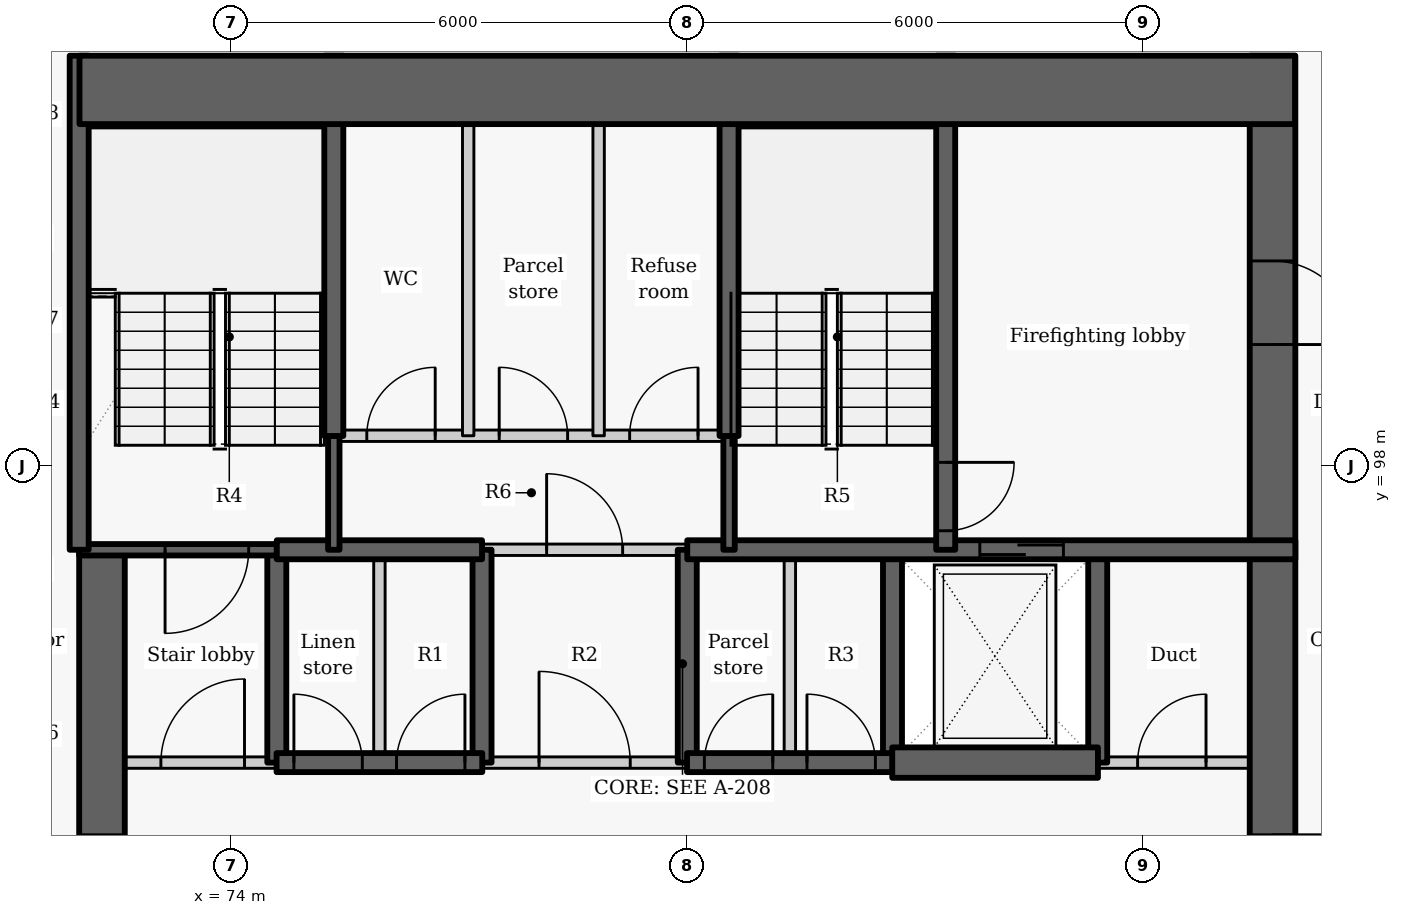
"""IFC4 building model, lengths in metres.
Left out: names, types, materials, properties, quantities, classifications, styles, units other than length and angle.
Written with IfcOpenShell. Run it as: python <this file> out.ifc"""

import sys

from ifc_helpers import new_model, si_unit, direction, frame, frame_2d, origin, place, context, subcontext, project, spatial, rectangle, extrude, element, fill, save


model = new_model("IFC4")
c1 = context("Model", 3, precision=1e-05, world=origin(), true_north=direction((0.0, 1.0)))
c2 = subcontext(c1, "Body", "Model", "MODEL_VIEW")
j1 = project(units=[si_unit("LENGTHUNIT", "METRE"), si_unit("PLANEANGLEUNIT", "RADIAN")], contexts=[c1])
p1 = place(None, origin())
s1 = spatial("IfcSite", under=j1, at=p1, CompositionType="ELEMENT")
p2 = place(p1, origin())
s2 = spatial("IfcBuilding", under=s1, at=p2, CompositionType="ELEMENT")
p3 = place(p2, frame((0.0, 0.0, 31.5)))
s3 = spatial("IfcBuildingStorey", under=s2, at=p3, CompositionType="ELEMENT", Elevation=31.5)
p4 = place(p3, frame((74.6, 94.1, -0.275), z_axis=(0.0, 0.0, 1.0), x_axis=(0.0, 1.0, 0.0)))
e1 = element("IfcWall", 1, at=p4, inside=s3, PredefinedType="SHEAR", context=c2, shape_type="SweptSolid", body=[
    extrude(rectangle(XDim=2.8, YDim=0.25, at=frame_2d((1.4, 0.0))), origin(), (0.0, 0.0, 1.0), 3.3),
])
p5 = place(p3, frame((72.3, 87.8, -0.275), z_axis=(0.0, 0.0, 1.0), x_axis=(0.0, 1.0, 0.0)))
e2 = element("IfcWall", 2, at=p5, inside=s3, PredefinedType="SHEAR", context=c2, shape_type="SweptSolid", body=[
    extrude(rectangle(XDim=9.1, YDim=0.6, at=frame_2d((4.55, 0.0))), origin(), (0.0, 0.0, 1.0), 3.3),
])
p6 = place(p5, frame((3.85, 0.0, 0.275)))
e3 = element("IfcOpeningElement", 3, at=p6, cuts=e2, PredefinedType="OPENING", context=c2, shape_type="SweptSolid", body=[
    extrude(rectangle(XDim=1.5, YDim=2.1, at=frame_2d((0.75, 1.05))), frame((0.0, 0.31, 0.0), z_axis=(0.0, -1.0, 0.0), x_axis=(1.0, 0.0, 0.0)), (0.0, 0.0, 1.0), 0.62),
])
for number, where, z_axis, x_axis in (
    (4, (77.3, 94.1, -0.275), (0.0, 0.0, 1.0), (0.0, 1.0, 0.0)),
    (5, (80.0, 94.1, -0.275), (0.0, 0.0, 1.0), (0.0, 1.0, 0.0)),
    (6, (82.7, 94.1, -0.275), (0.0, 0.0, 1.0), (0.0, 1.0, 0.0)),
    (7, (85.4, 94.1, -0.275), (0.0, 0.0, 1.0), (0.0, 1.0, 0.0)),
):
    element("IfcWall", number, at=place(p3, frame(where, z_axis=z_axis, x_axis=x_axis)), inside=s3, PredefinedType="SHEAR", context=c2, shape_type="SweptSolid", body=[
        extrude(rectangle(XDim=2.8, YDim=0.25, at=frame_2d((1.4, 0.0))), origin(), (0.0, 0.0, 1.0), 3.3),
    ])
p7 = place(p3, frame((87.7, 103.4, -0.275), z_axis=(0.0, 0.0, 1.0), x_axis=(0.0, -1.0, 0.0)))
e8 = element("IfcWall", 8, at=p7, inside=s3, PredefinedType="SHEAR", context=c2, shape_type="SweptSolid", body=[
    extrude(rectangle(XDim=15.6, YDim=0.6, at=frame_2d((7.8, 0.0))), origin(), (0.0, 0.0, 1.0), 3.3),
])
p8 = place(p7, frame((10.25, 0.0, 0.275)))
e9 = element("IfcOpeningElement", 9, at=p8, cuts=e8, PredefinedType="OPENING", context=c2, shape_type="SweptSolid", body=[
    extrude(rectangle(XDim=1.5, YDim=2.1, at=frame_2d((0.75, 1.05))), frame((0.0, 0.31, 0.0), z_axis=(0.0, -1.0, 0.0), x_axis=(1.0, 0.0, 0.0)), (0.0, 0.0, 1.0), 0.62),
])
p9 = place(p7, frame((2.7, 0.0, 0.275)))
e10 = element("IfcOpeningElement", 10, at=p9, cuts=e8, PredefinedType="OPENING", context=c2, shape_type="SweptSolid", body=[
    extrude(rectangle(XDim=1.1, YDim=2.1, at=frame_2d((0.55, 1.05))), frame((0.0, 0.31, 0.0), z_axis=(0.0, -1.0, 0.0), x_axis=(1.0, 0.0, 0.0)), (0.0, 0.0, 1.0), 0.62),
])
p10 = place(p3, frame((72.0, 94.1, 0.0), z_axis=(0.0, 0.0, 1.0), x_axis=(1.0, 0.0, 0.0)))
e11 = element("IfcWall", 11, at=p10, inside=s3, PredefinedType="PARTITIONING", context=c2, shape_type="SweptSolid", body=[
    extrude(rectangle(XDim=2.603, YDim=0.15, at=frame_2d((1.302, 0.0))), origin(), (0.0, 0.0, 1.0), 3.025),
])
p11 = place(p10, frame((1.075, 0.0, 0.0)))
e12 = element("IfcOpeningElement", 12, at=p11, cuts=e11, PredefinedType="OPENING", context=c2, shape_type="SweptSolid", body=[
    extrude(rectangle(XDim=1.1, YDim=2.1, at=frame_2d((0.55, 1.05))), frame((0.0, 0.085, 0.0), z_axis=(0.0, -1.0, 0.0), x_axis=(1.0, 0.0, 0.0)), (0.0, 0.0, 1.0), 0.17),
])
p12 = place(p3, frame((77.297, 94.1, 0.0), z_axis=(0.0, 0.0, 1.0), x_axis=(1.0, 0.0, 0.0)))
e13 = element("IfcWall", 13, at=p12, inside=s3, PredefinedType="PARTITIONING", context=c2, shape_type="SweptSolid", body=[
    extrude(rectangle(XDim=2.706, YDim=0.15, at=frame_2d((1.353, 0.0))), origin(), (0.0, 0.0, 1.0), 3.025),
])
p13 = place(p12, frame((0.753, 0.0, 0.0)))
e14 = element("IfcOpeningElement", 14, at=p13, cuts=e13, PredefinedType="OPENING", context=c2, shape_type="SweptSolid", body=[
    extrude(rectangle(XDim=1.2, YDim=2.1, at=frame_2d((0.6, 1.05))), frame((0.0, 0.085, 0.0), z_axis=(0.0, -1.0, 0.0), x_axis=(1.0, 0.0, 0.0)), (0.0, 0.0, 1.0), 0.17),
])
p14 = place(p3, frame((85.397, 94.1, 0.0), z_axis=(0.0, 0.0, 1.0), x_axis=(1.0, 0.0, 0.0)))
e15 = element("IfcWall", 15, at=p14, inside=s3, PredefinedType="PARTITIONING", context=c2, shape_type="SweptSolid", body=[
    extrude(rectangle(XDim=2.603, YDim=0.15, at=frame_2d((1.302, 0.0))), origin(), (0.0, 0.0, 1.0), 3.025),
])
p15 = place(p14, frame((0.528, 0.0, 0.0)))
e16 = element("IfcOpeningElement", 16, at=p15, cuts=e15, PredefinedType="OPENING", context=c2, shape_type="SweptSolid", body=[
    extrude(rectangle(XDim=0.9, YDim=2.1, at=frame_2d((0.45, 1.05))), frame((0.0, 0.085, 0.0), z_axis=(0.0, -1.0, 0.0), x_axis=(1.0, 0.0, 0.0)), (0.0, 0.0, 1.0), 0.17),
])
p16 = place(p3, frame((74.597, 94.1, -0.275), z_axis=(0.0, 0.0, 1.0), x_axis=(1.0, 0.0, 0.0)))
e17 = element("IfcWall", 17, at=p16, inside=s3, PredefinedType="SHEAR", context=c2, shape_type="SweptSolid", body=[
    extrude(rectangle(XDim=2.706, YDim=0.25, at=frame_2d((1.353, 0.0))), origin(), (0.0, 0.0, 1.0), 3.3),
])
p17 = place(p16, frame((0.228, 0.0, 0.275)))
e18 = element("IfcOpeningElement", 18, at=p17, cuts=e17, PredefinedType="OPENING", context=c2, shape_type="SweptSolid", body=[
    extrude(rectangle(XDim=0.9, YDim=2.1, at=frame_2d((0.45, 1.05))), frame((0.0, 0.135, 0.0), z_axis=(0.0, -1.0, 0.0), x_axis=(1.0, 0.0, 0.0)), (0.0, 0.0, 1.0), 0.27),
])
p18 = place(p16, frame((1.578, 0.0, 0.275)))
e19 = element("IfcOpeningElement", 19, at=p18, cuts=e17, PredefinedType="OPENING", context=c2, shape_type="SweptSolid", body=[
    extrude(rectangle(XDim=0.9, YDim=2.1, at=frame_2d((0.45, 1.05))), frame((0.0, 0.135, 0.0), z_axis=(0.0, -1.0, 0.0), x_axis=(1.0, 0.0, 0.0)), (0.0, 0.0, 1.0), 0.27),
])
p19 = place(p3, frame((79.997, 94.1, -0.275), z_axis=(0.0, 0.0, 1.0), x_axis=(1.0, 0.0, 0.0)))
e20 = element("IfcWall", 20, at=p19, inside=s3, PredefinedType="SHEAR", context=c2, shape_type="SweptSolid", body=[
    extrude(rectangle(XDim=2.706, YDim=0.25, at=frame_2d((1.353, 0.0))), origin(), (0.0, 0.0, 1.0), 3.3),
])
p20 = place(p19, frame((0.228, 0.0, 0.275)))
e21 = element("IfcOpeningElement", 21, at=p20, cuts=e20, PredefinedType="OPENING", context=c2, shape_type="SweptSolid", body=[
    extrude(rectangle(XDim=0.9, YDim=2.1, at=frame_2d((0.45, 1.05))), frame((0.0, 0.135, 0.0), z_axis=(0.0, -1.0, 0.0), x_axis=(1.0, 0.0, 0.0)), (0.0, 0.0, 1.0), 0.27),
])
p21 = place(p19, frame((1.578, 0.0, 0.275)))
e22 = element("IfcOpeningElement", 22, at=p21, cuts=e20, PredefinedType="OPENING", context=c2, shape_type="SweptSolid", body=[
    extrude(rectangle(XDim=0.9, YDim=2.1, at=frame_2d((0.45, 1.05))), frame((0.0, 0.135, 0.0), z_axis=(0.0, -1.0, 0.0), x_axis=(1.0, 0.0, 0.0)), (0.0, 0.0, 1.0), 0.27),
])
p22 = place(p3, frame((82.697, 94.1, -0.275), z_axis=(0.0, 0.0, 1.0), x_axis=(1.0, 0.0, 0.0)))
e23 = element("IfcWall", 23, at=p22, inside=s3, PredefinedType="SHEAR", context=c2, shape_type="SweptSolid", body=[
    extrude(rectangle(XDim=2.706, YDim=0.4, at=frame_2d((1.353, 0.0))), origin(), (0.0, 0.0, 1.0), 3.3),
])
p23 = place(p3, frame((74.6, 96.9, -0.275), z_axis=(0.0, 0.0, 1.0), x_axis=(-1.0, 0.0, 0.0)))
e24 = element("IfcWall", 24, at=p23, inside=s3, PredefinedType="SHEAR", context=c2, shape_type="SweptSolid", body=[
    extrude(rectangle(XDim=2.6, YDim=0.15, at=frame_2d((1.3, 0.0))), origin(), (0.0, 0.0, 1.0), 3.3),
])
p24 = place(p23, frame((0.37, 0.0, 0.275)))
e25 = element("IfcOpeningElement", 25, at=p24, cuts=e24, PredefinedType="OPENING", context=c2, shape_type="SweptSolid", body=[
    extrude(rectangle(XDim=1.1, YDim=2.1, at=frame_2d((0.55, 1.05))), frame((0.0, 0.085, 0.0), z_axis=(0.0, -1.0, 0.0), x_axis=(1.0, 0.0, 0.0)), (0.0, 0.0, 1.0), 0.17),
])
p25 = place(p3, frame((75.95, 94.1, 0.0), z_axis=(0.0, 0.0, 1.0), x_axis=(0.0, 1.0, 0.0)))
e26 = element("IfcWall", 26, at=p25, inside=s3, PredefinedType="PARTITIONING", context=c2, shape_type="SweptSolid", body=[
    extrude(rectangle(XDim=2.8, YDim=0.15, at=frame_2d((1.4, 0.0))), origin(), (0.0, 0.0, 1.0), 3.025),
])
p26 = place(p3, frame((74.6, 96.9, -0.275), z_axis=(0.0, 0.0, 1.0), x_axis=(1.0, 0.0, 0.0)))
e27 = element("IfcWall", 27, at=p26, inside=s3, PredefinedType="SHEAR", context=c2, shape_type="SweptSolid", body=[
    extrude(rectangle(XDim=2.7, YDim=0.25, at=frame_2d((1.35, 0.0))), origin(), (0.0, 0.0, 1.0), 3.3),
])
p27 = place(p3, frame((80.0, 96.9, -0.275), z_axis=(0.0, 0.0, 1.0), x_axis=(1.0, 0.0, 0.0)))
e28 = element("IfcWall", 28, at=p27, inside=s3, PredefinedType="SHEAR", context=c2, shape_type="SweptSolid", body=[
    extrude(rectangle(XDim=8.0, YDim=0.25, at=frame_2d((4.0, 0.0))), origin(), (0.0, 0.0, 1.0), 3.3),
])
p28 = place(p27, frame((3.849, 0.0, 0.275)))
e29 = element("IfcOpeningElement", 29, at=p28, cuts=e28, PredefinedType="OPENING", context=c2, shape_type="SweptSolid", body=[
    extrude(rectangle(XDim=1.1, YDim=2.1, at=frame_2d((0.55, 1.05))), frame((0.0, 0.135, 0.0), z_axis=(0.0, -1.0, 0.0), x_axis=(1.0, 0.0, 0.0)), (0.0, 0.0, 1.0), 0.27),
])
p29 = place(p3, frame((77.3, 96.9, 0.0), z_axis=(0.0, 0.0, 1.0), x_axis=(1.0, 0.0, 0.0)))
e30 = element("IfcWall", 30, at=p29, inside=s3, PredefinedType="PARTITIONING", context=c2, shape_type="SweptSolid", body=[
    extrude(rectangle(XDim=2.7, YDim=0.15, at=frame_2d((1.35, 0.0))), origin(), (0.0, 0.0, 1.0), 3.025),
])
p30 = place(p29, frame((0.85, 0.0, 0.0)))
e31 = element("IfcOpeningElement", 31, at=p30, cuts=e30, PredefinedType="OPENING", context=c2, shape_type="SweptSolid", body=[
    extrude(rectangle(XDim=1.0, YDim=2.1, at=frame_2d((0.5, 1.05))), frame((0.0, 0.085, 0.0), z_axis=(0.0, -1.0, 0.0), x_axis=(1.0, 0.0, 0.0)), (0.0, 0.0, 1.0), 0.17),
])
p31 = place(p3, frame((81.35, 94.1, 0.0), z_axis=(0.0, 0.0, 1.0), x_axis=(0.0, 1.0, 0.0)))
e32 = element("IfcWall", 32, at=p31, inside=s3, PredefinedType="PARTITIONING", context=c2, shape_type="SweptSolid", body=[
    extrude(rectangle(XDim=2.8, YDim=0.15, at=frame_2d((1.4, 0.0))), origin(), (0.0, 0.0, 1.0), 3.025),
])
p32 = place(p3, frame((75.35, 96.9, -0.275), z_axis=(0.0, 0.0, 1.0), x_axis=(0.0, 1.0, 0.0)))
e33 = element("IfcWall", 33, at=p32, inside=s3, PredefinedType="SHEAR", context=c2, shape_type="SweptSolid", body=[
    extrude(rectangle(XDim=1.503, YDim=0.15, at=frame_2d((0.751, 0.0))), origin(), (0.0, 0.0, 1.0), 3.3),
])
p33 = place(p3, frame((75.35, 98.397, -0.275), z_axis=(0.0, 0.0, 1.0), x_axis=(0.0, 1.0, 0.0)))
e34 = element("IfcWall", 34, at=p33, inside=s3, PredefinedType="SHEAR", context=c2, shape_type="SweptSolid", body=[
    extrude(rectangle(XDim=5.003, YDim=0.25, at=frame_2d((2.501, 0.0))), origin(), (0.0, 0.0, 1.0), 3.3),
])
p34 = place(p3, frame((72.0, 96.9, -0.275), z_axis=(0.0, 0.0, 1.0), x_axis=(0.0, 1.0, 0.0)))
e35 = element("IfcWall", 35, at=p34, inside=s3, PredefinedType="SHEAR", context=c2, shape_type="SweptSolid", body=[
    extrude(rectangle(XDim=6.5, YDim=0.25, at=frame_2d((3.25, 0.0))), origin(), (0.0, 0.0, 1.0), 3.3),
])
p35 = place(p3, frame((83.4, 103.4, -0.275), z_axis=(0.0, 0.0, 1.0), x_axis=(0.0, -1.0, 0.0)))
e36 = element("IfcWall", 36, at=p35, inside=s3, PredefinedType="SHEAR", context=c2, shape_type="SweptSolid", body=[
    extrude(rectangle(XDim=6.5, YDim=0.25, at=frame_2d((3.25, 0.0))), origin(), (0.0, 0.0, 1.0), 3.3),
])
p36 = place(p35, frame((5.35, 0.0, 0.275)))
e37 = element("IfcOpeningElement", 37, at=p36, cuts=e36, PredefinedType="OPENING", context=c2, shape_type="SweptSolid", body=[
    extrude(rectangle(XDim=0.9, YDim=2.1, at=frame_2d((0.45, 1.05))), frame((0.0, 0.135, 0.0), z_axis=(0.0, -1.0, 0.0), x_axis=(1.0, 0.0, 0.0)), (0.0, 0.0, 1.0), 0.27),
])
p37 = place(p3, frame((80.55, 96.9, -0.275), z_axis=(0.0, 0.0, 1.0), x_axis=(0.0, 1.0, 0.0)))
e38 = element("IfcWall", 38, at=p37, inside=s3, PredefinedType="SHEAR", context=c2, shape_type="SweptSolid", body=[
    extrude(rectangle(XDim=1.503, YDim=0.15, at=frame_2d((0.751, 0.0))), origin(), (0.0, 0.0, 1.0), 3.3),
])
p38 = place(p3, frame((80.55, 98.397, -0.275), z_axis=(0.0, 0.0, 1.0), x_axis=(0.0, 1.0, 0.0)))
e39 = element("IfcWall", 39, at=p38, inside=s3, PredefinedType="SHEAR", context=c2, shape_type="SweptSolid", body=[
    extrude(rectangle(XDim=5.003, YDim=0.25, at=frame_2d((2.501, 0.0))), origin(), (0.0, 0.0, 1.0), 3.3),
])
p39 = place(p3, frame((75.35, 98.4, 0.0), z_axis=(0.0, 0.0, 1.0), x_axis=(1.0, 0.0, 0.0)))
e40 = element("IfcWall", 40, at=p39, inside=s3, PredefinedType="PARTITIONING", context=c2, shape_type="SweptSolid", body=[
    extrude(rectangle(XDim=5.2, YDim=0.15, at=frame_2d((2.6, 0.0))), origin(), (0.0, 0.0, 1.0), 3.025),
])
p40 = place(p39, frame((0.434, 0.0, 0.0)))
e41 = element("IfcOpeningElement", 41, at=p40, cuts=e40, PredefinedType="OPENING", context=c2, shape_type="SweptSolid", body=[
    extrude(rectangle(XDim=0.9, YDim=2.1, at=frame_2d((0.45, 1.05))), frame((0.0, 0.085, 0.0), z_axis=(0.0, -1.0, 0.0), x_axis=(1.0, 0.0, 0.0)), (0.0, 0.0, 1.0), 0.17),
])
p41 = place(p39, frame((2.176, 0.0, 0.0)))
e42 = element("IfcOpeningElement", 42, at=p41, cuts=e40, PredefinedType="OPENING", context=c2, shape_type="SweptSolid", body=[
    extrude(rectangle(XDim=0.9, YDim=2.1, at=frame_2d((0.45, 1.05))), frame((0.0, 0.085, 0.0), z_axis=(0.0, -1.0, 0.0), x_axis=(1.0, 0.0, 0.0)), (0.0, 0.0, 1.0), 0.17),
])
p42 = place(p39, frame((3.892, 0.0, 0.0)))
e43 = element("IfcOpeningElement", 43, at=p42, cuts=e40, PredefinedType="OPENING", context=c2, shape_type="SweptSolid", body=[
    extrude(rectangle(XDim=0.9, YDim=2.1, at=frame_2d((0.45, 1.05))), frame((0.0, 0.085, 0.0), z_axis=(0.0, -1.0, 0.0), x_axis=(1.0, 0.0, 0.0)), (0.0, 0.0, 1.0), 0.17),
])
for number, where, z_axis, x_axis in (
    (44, (77.118, 98.4, 0.0), (0.0, 0.0, 1.0), (0.0, 1.0, 0.0)),
    (45, (78.834, 98.4, 0.0), (0.0, 0.0, 1.0), (0.0, 1.0, 0.0)),
):
    element("IfcWall", number, at=place(p3, frame(where, z_axis=z_axis, x_axis=x_axis)), inside=s3, PredefinedType="PARTITIONING", context=c2, shape_type="SweptSolid", body=[
        extrude(rectangle(XDim=5.0, YDim=0.15, at=frame_2d((2.5, 0.0))), origin(), (0.0, 0.0, 1.0), 3.025),
    ])
p43 = place(p3, frame((72.004, 102.95, -0.275), z_axis=(0.0, 0.0, 1.0), x_axis=(1.0, 0.0, 0.0)))
e46 = element("IfcWall", 46, at=p43, inside=s3, PredefinedType="SHEAR", context=c2, shape_type="SweptSolid", body=[
    extrude(rectangle(XDim=15.992, YDim=0.9, at=frame_2d((7.996, 0.0))), origin(), (0.0, 0.0, 1.0), 3.3),
])
p44 = place(p11, origin())
e47 = element("IfcDoor", 47, at=p44, inside=s3, OperationType="SINGLE_SWING_RIGHT", PredefinedType="DOOR", context=c2, shape_type="SweptSolid", body=[
    extrude(rectangle(XDim=1.1, YDim=2.1, at=frame_2d((0.55, 1.05))), frame((0.0, 0.025, 0.0), z_axis=(0.0, -1.0, 0.0), x_axis=(1.0, 0.0, 0.0)), (0.0, 0.0, 1.0), 0.05),
])
fill(e12, e47)
p45 = place(p17, origin())
e48 = element("IfcDoor", 48, at=p45, inside=s3, OperationType="SINGLE_SWING_LEFT", PredefinedType="DOOR", context=c2, shape_type="SweptSolid", body=[
    extrude(rectangle(XDim=0.9, YDim=2.1, at=frame_2d((0.45, 1.05))), frame((0.0, 0.025, 0.0), z_axis=(0.0, -1.0, 0.0), x_axis=(1.0, 0.0, 0.0)), (0.0, 0.0, 1.0), 0.05),
])
fill(e18, e48)
p46 = place(p18, origin())
e49 = element("IfcDoor", 49, at=p46, inside=s3, OperationType="SINGLE_SWING_RIGHT", PredefinedType="DOOR", context=c2, shape_type="SweptSolid", body=[
    extrude(rectangle(XDim=0.9, YDim=2.1, at=frame_2d((0.45, 1.05))), frame((0.0, 0.025, 0.0), z_axis=(0.0, -1.0, 0.0), x_axis=(1.0, 0.0, 0.0)), (0.0, 0.0, 1.0), 0.05),
])
fill(e19, e49)
p47 = place(p13, origin())
e50 = element("IfcDoor", 50, at=p47, inside=s3, OperationType="DOUBLE_DOOR_SINGLE_SWING", PredefinedType="DOOR", context=c2, shape_type="SweptSolid", body=[
    extrude(rectangle(XDim=1.2, YDim=2.1, at=frame_2d((0.6, 1.05))), frame((0.0, 0.025, 0.0), z_axis=(0.0, -1.0, 0.0), x_axis=(1.0, 0.0, 0.0)), (0.0, 0.0, 1.0), 0.05),
])
fill(e14, e50)
p48 = place(p20, origin())
e51 = element("IfcDoor", 51, at=p48, inside=s3, OperationType="SINGLE_SWING_RIGHT", PredefinedType="DOOR", context=c2, shape_type="SweptSolid", body=[
    extrude(rectangle(XDim=0.9, YDim=2.1, at=frame_2d((0.45, 1.05))), frame((0.0, 0.025, 0.0), z_axis=(0.0, -1.0, 0.0), x_axis=(1.0, 0.0, 0.0)), (0.0, 0.0, 1.0), 0.05),
])
fill(e21, e51)
p49 = place(p21, origin())
e52 = element("IfcDoor", 52, at=p49, inside=s3, OperationType="SINGLE_SWING_LEFT", PredefinedType="DOOR", context=c2, shape_type="SweptSolid", body=[
    extrude(rectangle(XDim=0.9, YDim=2.1, at=frame_2d((0.45, 1.05))), frame((0.0, 0.025, 0.0), z_axis=(0.0, -1.0, 0.0), x_axis=(1.0, 0.0, 0.0)), (0.0, 0.0, 1.0), 0.05),
])
fill(e22, e52)
p50 = place(p28, origin())
e53 = element("IfcDoor", 53, at=p50, inside=s3, OperationType="SLIDING_TO_LEFT", PredefinedType="DOOR", context=c2, shape_type="SweptSolid", body=[
    extrude(rectangle(XDim=1.1, YDim=2.1, at=frame_2d((0.55, 1.05))), frame((0.0, 0.025, 0.0), z_axis=(0.0, -1.0, 0.0), x_axis=(1.0, 0.0, 0.0)), (0.0, 0.0, 1.0), 0.05),
])
fill(e29, e53)
p51 = place(p15, origin())
e54 = element("IfcDoor", 54, at=p51, inside=s3, OperationType="SINGLE_SWING_RIGHT", PredefinedType="DOOR", context=c2, shape_type="SweptSolid", body=[
    extrude(rectangle(XDim=0.9, YDim=2.1, at=frame_2d((0.45, 1.05))), frame((0.0, 0.025, 0.0), z_axis=(0.0, -1.0, 0.0), x_axis=(1.0, 0.0, 0.0)), (0.0, 0.0, 1.0), 0.05),
])
fill(e16, e54)
p52 = place(p30, origin())
e55 = element("IfcDoor", 55, at=p52, inside=s3, OperationType="SINGLE_SWING_LEFT", PredefinedType="DOOR", context=c2, shape_type="SweptSolid", body=[
    extrude(rectangle(XDim=1.0, YDim=2.1, at=frame_2d((0.5, 1.05))), frame((0.0, 0.025, 0.0), z_axis=(0.0, -1.0, 0.0), x_axis=(1.0, 0.0, 0.0)), (0.0, 0.0, 1.0), 0.05),
])
fill(e31, e55)
p53 = place(p40, origin())
e56 = element("IfcDoor", 56, at=p53, inside=s3, OperationType="SINGLE_SWING_RIGHT", PredefinedType="DOOR", context=c2, shape_type="SweptSolid", body=[
    extrude(rectangle(XDim=0.9, YDim=2.1, at=frame_2d((0.45, 1.05))), frame((0.0, 0.025, 0.0), z_axis=(0.0, -1.0, 0.0), x_axis=(1.0, 0.0, 0.0)), (0.0, 0.0, 1.0), 0.05),
])
fill(e41, e56)
p54 = place(p41, origin())
e57 = element("IfcDoor", 57, at=p54, inside=s3, OperationType="SINGLE_SWING_LEFT", PredefinedType="DOOR", context=c2, shape_type="SweptSolid", body=[
    extrude(rectangle(XDim=0.9, YDim=2.1, at=frame_2d((0.45, 1.05))), frame((0.0, 0.025, 0.0), z_axis=(0.0, -1.0, 0.0), x_axis=(1.0, 0.0, 0.0)), (0.0, 0.0, 1.0), 0.05),
])
fill(e42, e57)
p55 = place(p42, origin())
e58 = element("IfcDoor", 58, at=p55, inside=s3, OperationType="SINGLE_SWING_RIGHT", PredefinedType="DOOR", context=c2, shape_type="SweptSolid", body=[
    extrude(rectangle(XDim=0.9, YDim=2.1, at=frame_2d((0.45, 1.05))), frame((0.0, 0.025, 0.0), z_axis=(0.0, -1.0, 0.0), x_axis=(1.0, 0.0, 0.0)), (0.0, 0.0, 1.0), 0.05),
])
fill(e43, e58)
p56 = place(p24, origin())
e59 = element("IfcDoor", 59, at=p56, inside=s3, OperationType="SINGLE_SWING_RIGHT", PredefinedType="DOOR", context=c2, shape_type="SweptSolid", body=[
    extrude(rectangle(XDim=1.1, YDim=2.1, at=frame_2d((0.55, 1.05))), frame((0.0, 0.025, 0.0), z_axis=(0.0, -1.0, 0.0), x_axis=(1.0, 0.0, 0.0)), (0.0, 0.0, 1.0), 0.05),
])
fill(e25, e59)
p57 = place(p36, origin())
e60 = element("IfcDoor", 60, at=p57, inside=s3, OperationType="SINGLE_SWING_LEFT", PredefinedType="DOOR", context=c2, shape_type="SweptSolid", body=[
    extrude(rectangle(XDim=0.9, YDim=2.1, at=frame_2d((0.45, 1.05))), frame((0.0, 0.025, 0.0), z_axis=(0.0, -1.0, 0.0), x_axis=(1.0, 0.0, 0.0)), (0.0, 0.0, 1.0), 0.05),
])
fill(e37, e60)
p58 = place(p6, origin())
e61 = element("IfcDoor", 61, at=p58, inside=s3, OperationType="DOUBLE_DOOR_SINGLE_SWING", PredefinedType="DOOR", context=c2, shape_type="SweptSolid", body=[
    extrude(rectangle(XDim=1.5, YDim=2.1, at=frame_2d((0.75, 1.05))), frame((0.0, 0.025, 0.0), z_axis=(0.0, -1.0, 0.0), x_axis=(1.0, 0.0, 0.0)), (0.0, 0.0, 1.0), 0.05),
])
fill(e3, e61)
p59 = place(p9, origin())
e62 = element("IfcDoor", 62, at=p59, inside=s3, OperationType="SINGLE_SWING_RIGHT", PredefinedType="DOOR", context=c2, shape_type="SweptSolid", body=[
    extrude(rectangle(XDim=1.1, YDim=2.1, at=frame_2d((0.55, 1.05))), frame((0.0, 0.025, 0.0), z_axis=(0.0, -1.0, 0.0), x_axis=(1.0, 0.0, 0.0)), (0.0, 0.0, 1.0), 0.05),
])
fill(e10, e62)
save(model, sys.argv[1])
